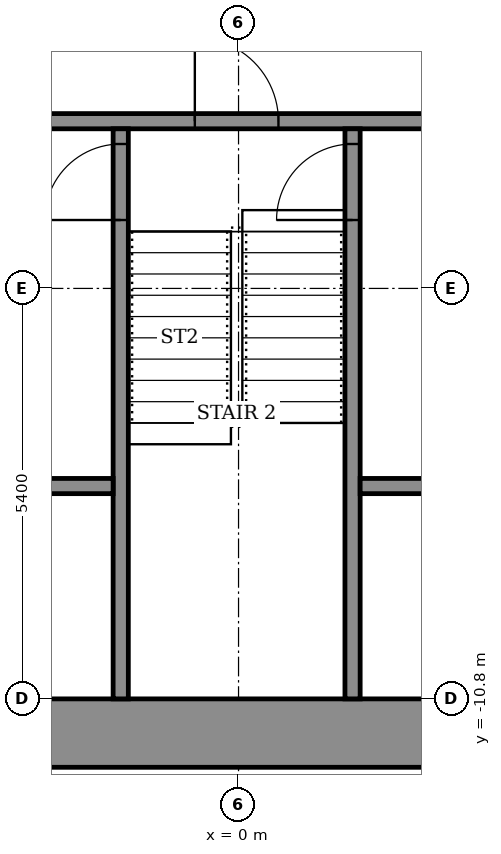
"""IFC4 building model, lengths in metres.
Left out: names, types, materials, properties, quantities, classifications, styles, units other than length and angle.
Written with IfcOpenShell. Run it as: python <this file> out.ifc"""

import sys

from ifc_helpers import new_model, si_unit, direction, frame, frame_2d, origin, place, context, subcontext, project, spatial, rectangle, extrude, element, fill, save


model = new_model("IFC4")
c1 = context("Model", 3, precision=1e-05, world=origin(), true_north=direction((0.0, 1.0)))
c2 = subcontext(c1, "Body", "Model", "MODEL_VIEW")
j1 = project(units=[si_unit("LENGTHUNIT", "METRE"), si_unit("PLANEANGLEUNIT", "RADIAN")], contexts=[c1])
p1 = place(None, origin())
s1 = spatial("IfcSite", under=j1, at=p1, CompositionType="ELEMENT")
p2 = place(p1, origin())
s2 = spatial("IfcBuilding", under=s1, at=p2, CompositionType="ELEMENT")
p3 = place(p2, frame((0.0, 0.0, 140.9)))
s3 = spatial("IfcBuildingStorey", under=s2, at=p3, CompositionType="ELEMENT", Elevation=140.9)
p4 = place(p3, frame((-14.7, -11.25, 0.0), z_axis=(0.0, 0.0, 1.0), x_axis=(1.0, 0.0, 0.0)))
e1 = element("IfcWall", 1, at=p4, inside=s3, PredefinedType="SHEAR", context=c2, shape_type="SweptSolid", body=[
    extrude(rectangle(XDim=29.4, YDim=0.9, at=frame_2d((14.7, 0.0))), origin(), (0.0, 0.0, 1.0), 3.6),
])
p5 = place(p3, frame((-10.9, -3.2, 0.0), z_axis=(0.0, 0.0, 1.0), x_axis=(1.0, 0.0, 0.0)))
e2 = element("IfcWall", 2, at=p5, inside=s3, PredefinedType="SHEAR", context=c2, shape_type="SweptSolid", body=[
    extrude(rectangle(XDim=21.8, YDim=0.2, at=frame_2d((10.9, 0.0))), origin(), (0.0, 0.0, 1.0), 3.05),
])
p6 = place(p5, frame((1.075, 0.0, 0.0)))
e3 = element("IfcOpeningElement", 3, at=p6, cuts=e2, PredefinedType="OPENING", context=c2, shape_type="SweptSolid", body=[
    extrude(rectangle(XDim=1.1, YDim=2.1, at=frame_2d((0.55, 1.05))), frame((0.0, 0.11, 0.0), z_axis=(0.0, -1.0, 0.0), x_axis=(1.0, 0.0, 0.0)), (0.0, 0.0, 1.0), 0.22),
])
p7 = place(p5, frame((10.325, 0.0, 0.0)))
e4 = element("IfcOpeningElement", 4, at=p7, cuts=e2, PredefinedType="OPENING", context=c2, shape_type="SweptSolid", body=[
    extrude(rectangle(XDim=1.1, YDim=2.1, at=frame_2d((0.55, 1.05))), frame((0.0, 0.11, 0.0), z_axis=(0.0, -1.0, 0.0), x_axis=(1.0, 0.0, 0.0)), (0.0, 0.0, 1.0), 0.22),
])
p8 = place(p5, frame((19.625, 0.0, 0.0)))
e5 = element("IfcOpeningElement", 5, at=p8, cuts=e2, PredefinedType="OPENING", context=c2, shape_type="SweptSolid", body=[
    extrude(rectangle(XDim=1.1, YDim=2.1, at=frame_2d((0.55, 1.05))), frame((0.0, 0.11, 0.0), z_axis=(0.0, -1.0, 0.0), x_axis=(1.0, 0.0, 0.0)), (0.0, 0.0, 1.0), 0.22),
])
p9 = place(p5, frame((5.7, 0.0, 0.0)))
e6 = element("IfcOpeningElement", 6, at=p9, cuts=e2, PredefinedType="OPENING", context=c2, shape_type="SweptSolid", body=[
    extrude(rectangle(XDim=1.1, YDim=2.1, at=frame_2d((0.55, 1.05))), frame((0.0, 0.11, 0.0), z_axis=(0.0, -1.0, 0.0), x_axis=(1.0, 0.0, 0.0)), (0.0, 0.0, 1.0), 0.22),
])
p10 = place(p5, frame((14.975, 0.0, 0.0)))
e7 = element("IfcOpeningElement", 7, at=p10, cuts=e2, PredefinedType="OPENING", context=c2, shape_type="SweptSolid", body=[
    extrude(rectangle(XDim=1.1, YDim=2.1, at=frame_2d((0.55, 1.05))), frame((0.0, 0.11, 0.0), z_axis=(0.0, -1.0, 0.0), x_axis=(1.0, 0.0, 0.0)), (0.0, 0.0, 1.0), 0.22),
])
p11 = place(p3, frame((-1.55, -10.8, 0.0), z_axis=(0.0, 0.0, 1.0), x_axis=(0.0, 1.0, 0.0)))
e8 = element("IfcWall", 8, at=p11, inside=s3, PredefinedType="SHEAR", context=c2, shape_type="SweptSolid", body=[
    extrude(rectangle(XDim=7.5, YDim=0.2, at=frame_2d((3.75, 0.0))), origin(), (0.0, 0.0, 1.0), 3.05),
])
p12 = place(p11, frame((6.3, 0.0, 0.0)))
e9 = element("IfcOpeningElement", 9, at=p12, cuts=e8, PredefinedType="OPENING", context=c2, shape_type="SweptSolid", body=[
    extrude(rectangle(XDim=1.0, YDim=2.1, at=frame_2d((0.5, 1.05))), frame((0.0, 0.11, 0.0), z_axis=(0.0, -1.0, 0.0), x_axis=(1.0, 0.0, 0.0)), (0.0, 0.0, 1.0), 0.22),
])
p13 = place(p3, frame((1.5, -10.8, 0.0), z_axis=(0.0, 0.0, 1.0), x_axis=(0.0, 1.0, 0.0)))
e10 = element("IfcWall", 10, at=p13, inside=s3, PredefinedType="SHEAR", context=c2, shape_type="SweptSolid", body=[
    extrude(rectangle(XDim=7.5, YDim=0.2, at=frame_2d((3.75, 0.0))), origin(), (0.0, 0.0, 1.0), 3.05),
])
p14 = place(p13, frame((6.3, 0.0, 0.0)))
e11 = element("IfcOpeningElement", 11, at=p14, cuts=e10, PredefinedType="OPENING", context=c2, shape_type="SweptSolid", body=[
    extrude(rectangle(XDim=1.0, YDim=2.1, at=frame_2d((0.5, 1.05))), frame((0.0, 0.11, 0.0), z_axis=(0.0, -1.0, 0.0), x_axis=(1.0, 0.0, 0.0)), (0.0, 0.0, 1.0), 0.22),
])
p15 = place(p3, frame((-7.65, -8.0, 0.0), z_axis=(0.0, 0.0, 1.0), x_axis=(1.0, 0.0, 0.0)))
e12 = element("IfcWall", 12, at=p15, inside=s3, PredefinedType="SHEAR", context=c2, shape_type="SweptSolid", body=[
    extrude(rectangle(XDim=6.0, YDim=0.2, at=frame_2d((3.0, 0.0))), origin(), (0.0, 0.0, 1.0), 3.05),
])
p16 = place(p15, frame((0.9, 0.0, 0.0)))
e13 = element("IfcOpeningElement", 13, at=p16, cuts=e12, PredefinedType="OPENING", context=c2, shape_type="SweptSolid", body=[
    extrude(rectangle(XDim=1.1, YDim=2.1, at=frame_2d((0.55, 1.05))), frame((0.0, 0.11, 0.0), z_axis=(0.0, -1.0, 0.0), x_axis=(1.0, 0.0, 0.0)), (0.0, 0.0, 1.0), 0.22),
])
p17 = place(p15, frame((4.0, 0.0, 0.0)))
e14 = element("IfcOpeningElement", 14, at=p17, cuts=e12, PredefinedType="OPENING", context=c2, shape_type="SweptSolid", body=[
    extrude(rectangle(XDim=1.1, YDim=2.1, at=frame_2d((0.55, 1.05))), frame((0.0, 0.11, 0.0), z_axis=(0.0, -1.0, 0.0), x_axis=(1.0, 0.0, 0.0)), (0.0, 0.0, 1.0), 0.22),
])
p18 = place(p3, frame((1.6, -8.0, 0.0), z_axis=(0.0, 0.0, 1.0), x_axis=(1.0, 0.0, 0.0)))
e15 = element("IfcWall", 15, at=p18, inside=s3, PredefinedType="SHEAR", context=c2, shape_type="SweptSolid", body=[
    extrude(rectangle(XDim=6.05, YDim=0.2, at=frame_2d((3.025, 0.0))), origin(), (0.0, 0.0, 1.0), 3.05),
])
p19 = place(p18, frame((0.913, 0.0, 0.0)))
e16 = element("IfcOpeningElement", 16, at=p19, cuts=e15, PredefinedType="OPENING", context=c2, shape_type="SweptSolid", body=[
    extrude(rectangle(XDim=1.1, YDim=2.1, at=frame_2d((0.55, 1.05))), frame((0.0, 0.11, 0.0), z_axis=(0.0, -1.0, 0.0), x_axis=(1.0, 0.0, 0.0)), (0.0, 0.0, 1.0), 0.22),
])
p20 = place(p18, frame((4.038, 0.0, 0.0)))
e17 = element("IfcOpeningElement", 17, at=p20, cuts=e15, PredefinedType="OPENING", context=c2, shape_type="SweptSolid", body=[
    extrude(rectangle(XDim=1.1, YDim=2.1, at=frame_2d((0.55, 1.05))), frame((0.0, 0.11, 0.0), z_axis=(0.0, -1.0, 0.0), x_axis=(1.0, 0.0, 0.0)), (0.0, 0.0, 1.0), 0.22),
])
p21 = place(p7, origin())
e18 = element("IfcDoor", 18, at=p21, inside=s3, OperationType="SINGLE_SWING_RIGHT", PredefinedType="DOOR", context=c2, shape_type="SweptSolid", body=[
    extrude(rectangle(XDim=1.1, YDim=2.1, at=frame_2d((0.55, 1.05))), frame((0.0, 0.025, 0.0), z_axis=(0.0, -1.0, 0.0), x_axis=(1.0, 0.0, 0.0)), (0.0, 0.0, 1.0), 0.05),
])
fill(e4, e18)
p22 = place(p12, origin())
e19 = element("IfcDoor", 19, at=p22, inside=s3, OperationType="SINGLE_SWING_RIGHT", PredefinedType="DOOR", context=c2, shape_type="SweptSolid", body=[
    extrude(rectangle(XDim=1.0, YDim=2.1, at=frame_2d((0.5, 1.05))), frame((0.0, 0.025, 0.0), z_axis=(0.0, -1.0, 0.0), x_axis=(1.0, 0.0, 0.0)), (0.0, 0.0, 1.0), 0.05),
])
fill(e9, e19)
p23 = place(p14, origin())
e20 = element("IfcDoor", 20, at=p23, inside=s3, OperationType="SINGLE_SWING_RIGHT", PredefinedType="DOOR", context=c2, shape_type="SweptSolid", body=[
    extrude(rectangle(XDim=1.0, YDim=2.1, at=frame_2d((0.5, 1.05))), frame((0.0, 0.025, 0.0), z_axis=(0.0, -1.0, 0.0), x_axis=(1.0, 0.0, 0.0)), (0.0, 0.0, 1.0), 0.05),
])
fill(e11, e20)
save(model, sys.argv[1])
